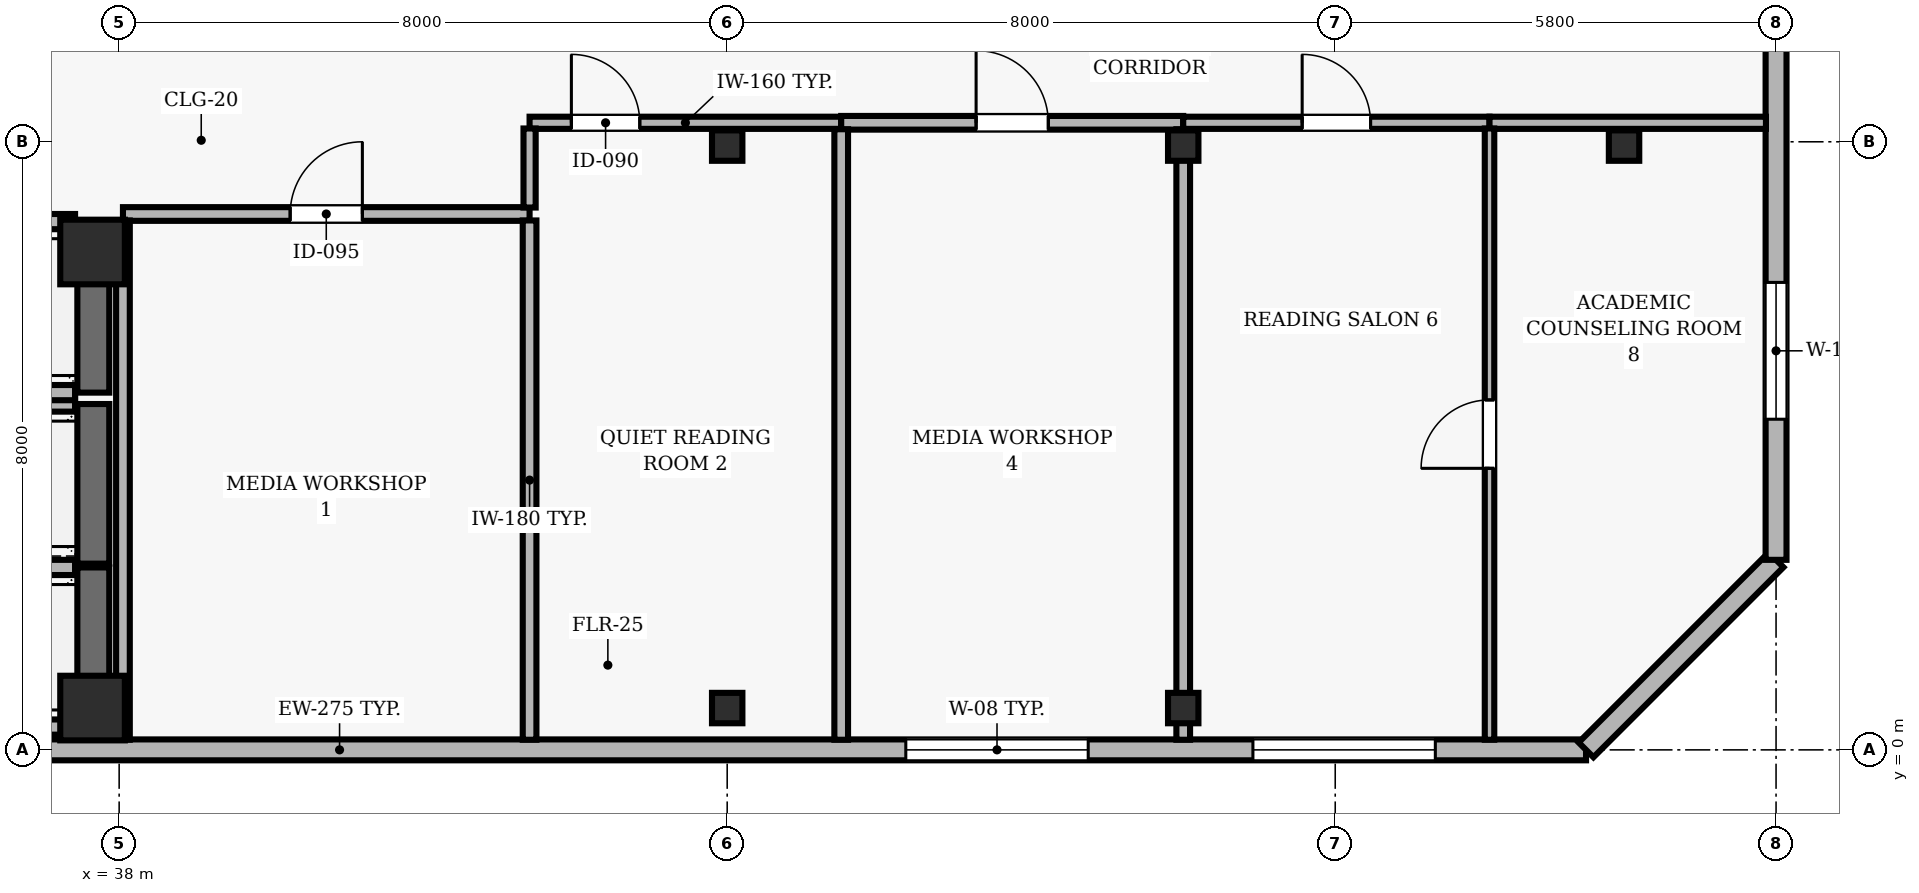
"""IFC4 building model, lengths in metres.
Left out: names, types, materials, properties, quantities, classifications, styles, units other than length and angle.
Written with IfcOpenShell. Run it as: python <this file> out.ifc"""

import sys

from ifc_helpers import new_model, si_unit, direction, frame, frame_2d, origin, origin_2d, place, context, subcontext, project, spatial, rectangle, hollow_rectangle, extrude, element, fill, save


model = new_model("IFC4")
c1 = context("Model", 3, precision=1e-05, world=origin(), true_north=direction((0.0, 1.0)))
c2 = subcontext(c1, "Body", "Model", "MODEL_VIEW")
j1 = project(units=[si_unit("LENGTHUNIT", "METRE"), si_unit("PLANEANGLEUNIT", "RADIAN")], contexts=[c1])
p1 = place(None, origin())
s1 = spatial("IfcSite", under=j1, at=p1, CompositionType="ELEMENT")
p2 = place(p1, origin())
s2 = spatial("IfcBuilding", under=s1, at=p2, CompositionType="ELEMENT")
p3 = place(p2, frame((0.0, 0.0, 275.5)))
s3 = spatial("IfcBuildingStorey", under=s2, at=p3, CompositionType="ELEMENT", Elevation=275.5)
for number, where, z_axis, x_axis in (
    (1, (37.65, 0.55, 0.0), (0.0, 0.0, 1.0), (1.0, 0.0, 0.0)),
    (2, (37.65, 6.55, 0.0), (0.0, 0.0, 1.0), (1.0, 0.0, 0.0)),
):
    element("IfcColumn", number, at=place(p3, frame(where, z_axis=z_axis, x_axis=x_axis)), inside=s3, PredefinedType="COLUMN", context=c2, shape_type="SweptSolid", body=[
        extrude(rectangle(XDim=0.85, YDim=0.85, at=origin_2d()), origin(), (0.0, 0.0, 1.0), 3.9),
    ])
for number, where, z_axis, x_axis in (
    (3, (46.0, 0.55, 0.0), (0.0, 0.0, 1.0), (1.0, 0.0, 0.0)),
    (4, (46.0, 7.95, 0.0), (0.0, 0.0, 1.0), (1.0, 0.0, 0.0)),
    (5, (52.0, 0.55, 0.0), (0.0, 0.0, 1.0), (1.0, 0.0, 0.0)),
    (6, (52.0, 7.95, 0.0), (0.0, 0.0, 1.0), (1.0, 0.0, 0.0)),
    (7, (57.8, 7.95, 0.0), (0.0, 0.0, 1.0), (1.0, 0.0, 0.0)),
):
    element("IfcColumn", number, at=place(p3, frame(where, z_axis=z_axis, x_axis=x_axis)), inside=s3, PredefinedType="COLUMN", context=c2, shape_type="SweptSolid", body=[
        extrude(hollow_rectangle(XDim=0.4, YDim=0.4, WallThickness=0.02, at=origin_2d()), origin(), (0.0, 0.0, 1.0), 3.9),
    ])
p4 = place(p3, frame((24.5, 0.0, 0.0), z_axis=(0.0, 0.0, 1.0), x_axis=(1.0, 0.0, 0.0)))
e8 = element("IfcWall", 8, at=p4, inside=s3, PredefinedType="SOLIDWALL", context=c2, shape_type="SweptSolid", body=[
    extrude(rectangle(XDim=32.8, YDim=0.275, at=frame_2d((16.4, 0.0))), origin(), (0.0, 0.0, 1.0), 3.69),
])
p5 = place(p4, frame((1.533, 0.0, 0.9)))
e9 = element("IfcOpeningElement", 9, at=p5, cuts=e8, PredefinedType="OPENING", context=c2, shape_type="SweptSolid", body=[
    extrude(rectangle(XDim=2.4, YDim=1.8, at=frame_2d((1.2, 0.9))), frame((0.0, 0.147, 0.0), z_axis=(0.0, -1.0, 0.0), x_axis=(1.0, 0.0, 0.0)), (0.0, 0.0, 1.0), 0.295),
])
p6 = place(p4, frame((23.85, 0.0, 0.9)))
e10 = element("IfcOpeningElement", 10, at=p6, cuts=e8, PredefinedType="OPENING", context=c2, shape_type="SweptSolid", body=[
    extrude(rectangle(XDim=2.4, YDim=1.8, at=frame_2d((1.2, 0.9))), frame((0.0, 0.147, 0.0), z_axis=(0.0, -1.0, 0.0), x_axis=(1.0, 0.0, 0.0)), (0.0, 0.0, 1.0), 0.295),
])
p7 = place(p4, frame((28.417, 0.0, 0.9)))
e11 = element("IfcOpeningElement", 11, at=p7, cuts=e8, PredefinedType="OPENING", context=c2, shape_type="SweptSolid", body=[
    extrude(rectangle(XDim=2.4, YDim=1.8, at=frame_2d((1.2, 0.9))), frame((0.0, 0.147, 0.0), z_axis=(0.0, -1.0, 0.0), x_axis=(1.0, 0.0, 0.0)), (0.0, 0.0, 1.0), 0.295),
])
p8 = place(p3, frame((57.3, 0.0, 0.0), z_axis=(0.0, 0.0, 1.0), x_axis=(0.707106781187, 0.707106781187, 0.0)))
e12 = element("IfcWall", 12, at=p8, inside=s3, PredefinedType="SOLIDWALL", context=c2, shape_type="SweptSolid", body=[
    extrude(rectangle(XDim=3.536, YDim=0.275, at=frame_2d((1.768, 0.0))), origin(), (0.0, 0.0, 1.0), 3.69),
])
p9 = place(p3, frame((59.8, 2.5, 0.0), z_axis=(0.0, 0.0, 1.0), x_axis=(0.0, 1.0, 0.0)))
e13 = element("IfcWall", 13, at=p9, inside=s3, PredefinedType="SOLIDWALL", context=c2, shape_type="SweptSolid", body=[
    extrude(rectangle(XDim=11.0, YDim=0.275, at=frame_2d((5.5, 0.0))), origin(), (0.0, 0.0, 1.0), 3.69),
])
p10 = place(p9, frame((1.85, 0.0, 0.9)))
e14 = element("IfcOpeningElement", 14, at=p10, cuts=e13, PredefinedType="OPENING", context=c2, shape_type="SweptSolid", body=[
    extrude(rectangle(XDim=1.8, YDim=2.2, at=frame_2d((0.9, 1.1))), frame((0.0, 0.147, 0.0), z_axis=(0.0, -1.0, 0.0), x_axis=(1.0, 0.0, 0.0)), (0.0, 0.0, 1.0), 0.295),
])
p11 = place(p3, frame((37.66, 0.3, 0.0), z_axis=(0.0, 0.0, 1.0), x_axis=(0.0, 1.0, 0.0)))
e15 = element("IfcWall", 15, at=p11, inside=s3, PredefinedType="SHEAR", context=c2, shape_type="SweptSolid", body=[
    extrude(rectangle(XDim=2.1, YDim=0.42, at=frame_2d((1.05, 0.0))), origin(), (0.0, 0.0, 1.0), 3.69),
])
for number, where, z_axis, x_axis in (
    (16, (35.28, 0.3, 0.0), (0.0, 0.0, 1.0), (1.0, 0.0, 0.0)),
    (17, (37.42, 2.4, 0.0), (0.0, 0.0, 1.0), (-1.0, 0.0, 0.0)),
):
    element("IfcWall", number, at=place(p3, frame(where, z_axis=z_axis, x_axis=x_axis)), inside=s3, PredefinedType="SOLIDWALL", context=c2, shape_type="SweptSolid", body=[
        extrude(rectangle(XDim=2.14, YDim=0.2, at=frame_2d((1.07, 0.0))), origin(), (0.0, 0.0, 1.0), 3.69),
    ])
p12 = place(p3, frame((37.66, 2.45, 0.0), z_axis=(0.0, 0.0, 1.0), x_axis=(0.0, 1.0, 0.0)))
e18 = element("IfcWall", 18, at=p12, inside=s3, PredefinedType="SHEAR", context=c2, shape_type="SweptSolid", body=[
    extrude(rectangle(XDim=2.1, YDim=0.42, at=frame_2d((1.05, 0.0))), origin(), (0.0, 0.0, 1.0), 3.69),
])
p13 = place(p3, frame((37.42, 4.55, 0.0), z_axis=(0.0, 0.0, 1.0), x_axis=(-1.0, 0.0, 0.0)))
e19 = element("IfcWall", 19, at=p13, inside=s3, PredefinedType="SOLIDWALL", context=c2, shape_type="SweptSolid", body=[
    extrude(rectangle(XDim=2.14, YDim=0.2, at=frame_2d((1.07, 0.0))), origin(), (0.0, 0.0, 1.0), 3.69),
])
p14 = place(p3, frame((37.66, 4.7, 0.0), z_axis=(0.0, 0.0, 1.0), x_axis=(0.0, 1.0, 0.0)))
e20 = element("IfcWall", 20, at=p14, inside=s3, PredefinedType="SHEAR", context=c2, shape_type="SweptSolid", body=[
    extrude(rectangle(XDim=2.25, YDim=0.42, at=frame_2d((1.125, 0.0))), origin(), (0.0, 0.0, 1.0), 3.69),
])
for number, where, z_axis, x_axis in (
    (21, (35.28, 4.7, 0.0), (0.0, 0.0, 1.0), (1.0, 0.0, 0.0)),
    (22, (37.42, 6.95, 0.0), (0.0, 0.0, 1.0), (-1.0, 0.0, 0.0)),
):
    element("IfcWall", number, at=place(p3, frame(where, z_axis=z_axis, x_axis=x_axis)), inside=s3, PredefinedType="SOLIDWALL", context=c2, shape_type="SweptSolid", body=[
        extrude(rectangle(XDim=2.14, YDim=0.2, at=frame_2d((1.07, 0.0))), origin(), (0.0, 0.0, 1.0), 3.69),
    ])
p15 = place(p3, frame((38.05, 7.05, 0.0), z_axis=(0.0, 0.0, 1.0), x_axis=(1.0, 0.0, 0.0)))
e23 = element("IfcWall", 23, at=p15, inside=s3, PredefinedType="PARTITIONING", context=c2, shape_type="SweptSolid", body=[
    extrude(rectangle(XDim=5.35, YDim=0.18, at=frame_2d((2.675, 0.0))), origin(), (0.0, 0.0, 1.0), 3.69),
])
p16 = place(p15, frame((2.2, 0.0, 0.0)))
e24 = element("IfcOpeningElement", 24, at=p16, cuts=e23, PredefinedType="OPENING", context=c2, shape_type="SweptSolid", body=[
    extrude(rectangle(XDim=0.95, YDim=2.1, at=frame_2d((0.475, 1.05))), frame((0.0, 0.1, 0.0), z_axis=(0.0, -1.0, 0.0), x_axis=(1.0, 0.0, 0.0)), (0.0, 0.0, 1.0), 0.2),
])
p17 = place(p3, frame((43.4, 8.25, 0.0), z_axis=(0.0, 0.0, 1.0), x_axis=(1.0, 0.0, 0.0)))
e25 = element("IfcWall", 25, at=p17, inside=s3, PredefinedType="PARTITIONING", context=c2, shape_type="SweptSolid", body=[
    extrude(rectangle(XDim=4.1, YDim=0.16, at=frame_2d((2.05, 0.0))), origin(), (0.0, 0.0, 1.0), 3.227),
])
p18 = place(p17, frame((0.55, 0.0, 0.0)))
e26 = element("IfcOpeningElement", 26, at=p18, cuts=e25, PredefinedType="OPENING", context=c2, shape_type="SweptSolid", body=[
    extrude(rectangle(XDim=0.9, YDim=2.1, at=frame_2d((0.45, 1.05))), frame((0.0, 0.09, 0.0), z_axis=(0.0, -1.0, 0.0), x_axis=(1.0, 0.0, 0.0)), (0.0, 0.0, 1.0), 0.18),
])
p19 = place(p3, frame((47.5, 8.25, 0.0), z_axis=(0.0, 0.0, 1.0), x_axis=(1.0, 0.0, 0.0)))
e27 = element("IfcWall", 27, at=p19, inside=s3, PredefinedType="PARTITIONING", context=c2, shape_type="SweptSolid", body=[
    extrude(rectangle(XDim=4.5, YDim=0.18, at=frame_2d((2.25, 0.0))), origin(), (0.0, 0.0, 1.0), 3.227),
])
p20 = place(p19, frame((1.775, 0.0, 0.0)))
e28 = element("IfcOpeningElement", 28, at=p20, cuts=e27, PredefinedType="OPENING", context=c2, shape_type="SweptSolid", body=[
    extrude(rectangle(XDim=0.95, YDim=2.1, at=frame_2d((0.475, 1.05))), frame((0.0, 0.1, 0.0), z_axis=(0.0, -1.0, 0.0), x_axis=(1.0, 0.0, 0.0)), (0.0, 0.0, 1.0), 0.2),
])
p21 = place(p3, frame((52.0, 8.25, 0.0), z_axis=(0.0, 0.0, 1.0), x_axis=(1.0, 0.0, 0.0)))
e29 = element("IfcWall", 29, at=p21, inside=s3, PredefinedType="PARTITIONING", context=c2, shape_type="SweptSolid", body=[
    extrude(rectangle(XDim=4.03, YDim=0.16, at=frame_2d((2.015, 0.0))), origin(), (0.0, 0.0, 1.0), 3.227),
])
p22 = place(p21, frame((1.565, 0.0, 0.0)))
e30 = element("IfcOpeningElement", 30, at=p22, cuts=e29, PredefinedType="OPENING", context=c2, shape_type="SweptSolid", body=[
    extrude(rectangle(XDim=0.9, YDim=2.1, at=frame_2d((0.45, 1.05))), frame((0.0, 0.09, 0.0), z_axis=(0.0, -1.0, 0.0), x_axis=(1.0, 0.0, 0.0)), (0.0, 0.0, 1.0), 0.18),
])
p23 = place(p3, frame((56.03, 8.25, 0.0), z_axis=(0.0, 0.0, 1.0), x_axis=(1.0, 0.0, 0.0)))
e31 = element("IfcWall", 31, at=p23, inside=s3, PredefinedType="PARTITIONING", context=c2, shape_type="SweptSolid", body=[
    extrude(rectangle(XDim=3.637, YDim=0.16, at=frame_2d((1.818, 0.0))), origin(), (0.0, 0.0, 1.0), 3.227),
])
p24 = place(p3, frame((38.05, 6.965, 0.0), z_axis=(0.0, 0.0, 1.0), x_axis=(0.0, -1.0, 0.0)))
e32 = element("IfcWall", 32, at=p24, inside=s3, PredefinedType="PARTITIONING", context=c2, shape_type="SweptSolid", body=[
    extrude(rectangle(XDim=6.832, YDim=0.18, at=frame_2d((3.416, 0.0))), origin(), (0.0, 0.0, 1.0), 3.227),
])
p25 = place(p3, frame((43.4, 0.133, 0.0), z_axis=(0.0, 0.0, 1.0), x_axis=(0.0, 1.0, 0.0)))
e33 = element("IfcWall", 33, at=p25, inside=s3, PredefinedType="PARTITIONING", context=c2, shape_type="SweptSolid", body=[
    extrude(rectangle(XDim=6.832, YDim=0.18, at=frame_2d((3.416, 0.0))), origin(), (0.0, 0.0, 1.0), 3.69),
])
p26 = place(p3, frame((43.4, 7.135, 0.0), z_axis=(0.0, 0.0, 1.0), x_axis=(0.0, 1.0, 0.0)))
e34 = element("IfcWall", 34, at=p26, inside=s3, PredefinedType="PARTITIONING", context=c2, shape_type="SweptSolid", body=[
    extrude(rectangle(XDim=1.04, YDim=0.16, at=frame_2d((0.52, 0.0))), origin(), (0.0, 0.0, 1.0), 3.69),
])
p27 = place(p3, frame((47.5, 0.133, 0.0), z_axis=(0.0, 0.0, 1.0), x_axis=(0.0, 1.0, 0.0)))
e35 = element("IfcWall", 35, at=p27, inside=s3, PredefinedType="PARTITIONING", context=c2, shape_type="SweptSolid", body=[
    extrude(rectangle(XDim=8.032, YDim=0.18, at=frame_2d((4.016, 0.0))), origin(), (0.0, 0.0, 1.0), 3.69),
])
p28 = place(p3, frame((52.0, 0.133, 0.0), z_axis=(0.0, 0.0, 1.0), x_axis=(0.0, 1.0, 0.0)))
e36 = element("IfcWall", 36, at=p28, inside=s3, PredefinedType="PARTITIONING", context=c2, shape_type="SweptSolid", body=[
    extrude(rectangle(XDim=8.032, YDim=0.18, at=frame_2d((4.016, 0.0))), origin(), (0.0, 0.0, 1.0), 3.227),
])
p29 = place(p3, frame((56.03, 0.133, 0.0), z_axis=(0.0, 0.0, 1.0), x_axis=(0.0, 1.0, 0.0)))
e37 = element("IfcWall", 37, at=p29, inside=s3, PredefinedType="PARTITIONING", context=c2, shape_type="SweptSolid", body=[
    extrude(rectangle(XDim=8.042, YDim=0.125, at=frame_2d((4.021, 0.0))), origin(), (0.0, 0.0, 1.0), 3.69),
])
p30 = place(p29, frame((3.571, 0.0, 0.0)))
e38 = element("IfcOpeningElement", 38, at=p30, cuts=e37, PredefinedType="OPENING", context=c2, shape_type="SweptSolid", body=[
    extrude(rectangle(XDim=0.9, YDim=2.1, at=frame_2d((0.45, 1.05))), frame((0.0, 0.073, 0.0), z_axis=(0.0, -1.0, 0.0), x_axis=(1.0, 0.0, 0.0)), (0.0, 0.0, 1.0), 0.145),
])
p31 = place(p6, origin())
e39 = element("IfcWindow", 39, at=p31, inside=s3, PartitioningType="SINGLE_PANEL", PredefinedType="WINDOW", context=c2, shape_type="SweptSolid", body=[
    extrude(rectangle(XDim=2.4, YDim=1.8, at=frame_2d((1.2, 0.9))), frame((0.0, 0.03, 0.0), z_axis=(0.0, -1.0, 0.0), x_axis=(1.0, 0.0, 0.0)), (0.0, 0.0, 1.0), 0.06),
])
fill(e10, e39)
p32 = place(p7, origin())
e40 = element("IfcWindow", 40, at=p32, inside=s3, PartitioningType="SINGLE_PANEL", PredefinedType="WINDOW", context=c2, shape_type="SweptSolid", body=[
    extrude(rectangle(XDim=2.4, YDim=1.8, at=frame_2d((1.2, 0.9))), frame((0.0, 0.03, 0.0), z_axis=(0.0, -1.0, 0.0), x_axis=(1.0, 0.0, 0.0)), (0.0, 0.0, 1.0), 0.06),
])
fill(e11, e40)
p33 = place(p10, origin())
e41 = element("IfcWindow", 41, at=p33, inside=s3, PartitioningType="SINGLE_PANEL", PredefinedType="WINDOW", context=c2, shape_type="SweptSolid", body=[
    extrude(rectangle(XDim=1.8, YDim=2.2, at=frame_2d((0.9, 1.1))), frame((0.0, 0.03, 0.0), z_axis=(0.0, -1.0, 0.0), x_axis=(1.0, 0.0, 0.0)), (0.0, 0.0, 1.0), 0.06),
])
fill(e14, e41)
p34 = place(p16, origin())
e42 = element("IfcDoor", 42, at=p34, inside=s3, OperationType="SINGLE_SWING_RIGHT", PredefinedType="DOOR", context=c2, shape_type="SweptSolid", body=[
    extrude(rectangle(XDim=0.95, YDim=2.1, at=frame_2d((0.475, 1.05))), frame((0.0, 0.025, 0.0), z_axis=(0.0, -1.0, 0.0), x_axis=(1.0, 0.0, 0.0)), (0.0, 0.0, 1.0), 0.05),
])
fill(e24, e42)
p35 = place(p18, origin())
e43 = element("IfcDoor", 43, at=p35, inside=s3, OperationType="SINGLE_SWING_LEFT", PredefinedType="DOOR", context=c2, shape_type="SweptSolid", body=[
    extrude(rectangle(XDim=0.9, YDim=2.1, at=frame_2d((0.45, 1.05))), frame((0.0, 0.025, 0.0), z_axis=(0.0, -1.0, 0.0), x_axis=(1.0, 0.0, 0.0)), (0.0, 0.0, 1.0), 0.05),
])
fill(e26, e43)
p36 = place(p20, origin())
e44 = element("IfcDoor", 44, at=p36, inside=s3, OperationType="SINGLE_SWING_LEFT", PredefinedType="DOOR", context=c2, shape_type="SweptSolid", body=[
    extrude(rectangle(XDim=0.95, YDim=2.1, at=frame_2d((0.475, 1.05))), frame((0.0, 0.025, 0.0), z_axis=(0.0, -1.0, 0.0), x_axis=(1.0, 0.0, 0.0)), (0.0, 0.0, 1.0), 0.05),
])
fill(e28, e44)
p37 = place(p22, origin())
e45 = element("IfcDoor", 45, at=p37, inside=s3, OperationType="SINGLE_SWING_LEFT", PredefinedType="DOOR", context=c2, shape_type="SweptSolid", body=[
    extrude(rectangle(XDim=0.9, YDim=2.1, at=frame_2d((0.45, 1.05))), frame((0.0, 0.025, 0.0), z_axis=(0.0, -1.0, 0.0), x_axis=(1.0, 0.0, 0.0)), (0.0, 0.0, 1.0), 0.05),
])
fill(e30, e45)
p38 = place(p30, origin())
e46 = element("IfcDoor", 46, at=p38, inside=s3, OperationType="SINGLE_SWING_LEFT", PredefinedType="DOOR", context=c2, shape_type="SweptSolid", body=[
    extrude(rectangle(XDim=0.9, YDim=2.1, at=frame_2d((0.45, 1.05))), frame((0.0, 0.025, 0.0), z_axis=(0.0, -1.0, 0.0), x_axis=(1.0, 0.0, 0.0)), (0.0, 0.0, 1.0), 0.05),
])
fill(e38, e46)
save(model, sys.argv[1])
